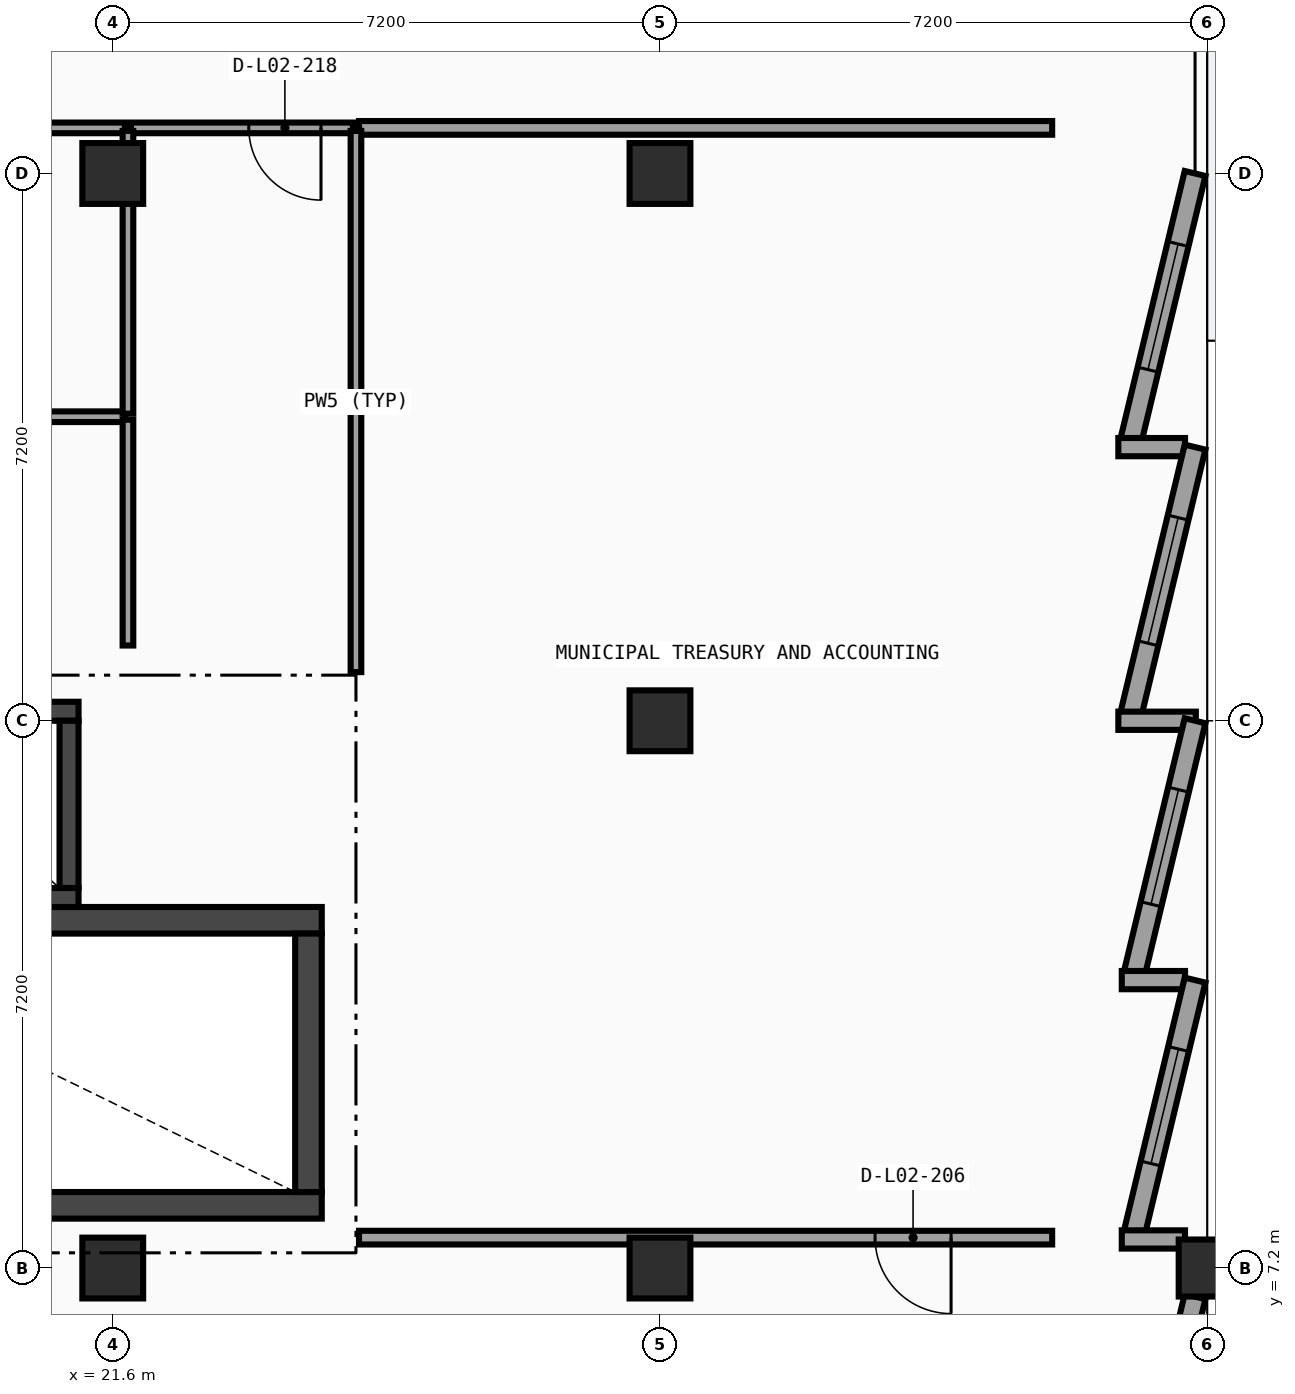
"""IFC4 building model, lengths in metres.
Left out: names, types, materials, properties, quantities, classifications, styles, units other than length and angle.
Written with IfcOpenShell. Run it as: python <this file> out.ifc"""

import sys

from ifc_helpers import new_model, si_unit, direction, frame, frame_2d, origin, origin_2d, place, context, subcontext, project, spatial, rectangle, extrude, element, fill, save


model = new_model("IFC4")
c1 = context("Model", 3, precision=1e-05, world=origin(), true_north=direction((0.0, 1.0)))
c2 = subcontext(c1, "Body", "Model", "MODEL_VIEW")
j1 = project(units=[si_unit("LENGTHUNIT", "METRE"), si_unit("PLANEANGLEUNIT", "RADIAN")], contexts=[c1])
p1 = place(None, origin())
s1 = spatial("IfcSite", under=j1, at=p1, CompositionType="ELEMENT")
p2 = place(p1, origin())
s2 = spatial("IfcBuilding", under=s1, at=p2, CompositionType="ELEMENT")
p3 = place(p2, frame((0.0, 0.0, 10.2)))
s3 = spatial("IfcBuildingStorey", under=s2, at=p3, CompositionType="ELEMENT", Elevation=10.2)
for number, where, z_axis, x_axis in (
    (1, (21.6, 7.2, 0.0), (0.0, 0.0, 1.0), (1.0, 0.0, 0.0)),
    (2, (21.6, 21.6, 0.0), (0.0, 0.0, 1.0), (1.0, 0.0, 0.0)),
    (3, (28.8, 7.2, 0.0), (0.0, 0.0, 1.0), (1.0, 0.0, 0.0)),
    (4, (28.8, 14.4, 0.0), (0.0, 0.0, 1.0), (1.0, 0.0, 0.0)),
    (5, (28.8, 21.6, 0.0), (0.0, 0.0, 1.0), (1.0, 0.0, 0.0)),
):
    element("IfcColumn", number, at=place(p3, frame(where, z_axis=z_axis, x_axis=x_axis)), inside=s3, PredefinedType="COLUMN", context=c2, shape_type="SweptSolid", body=[
        extrude(rectangle(XDim=0.8, YDim=0.8, at=origin_2d()), origin(), (0.0, 0.0, 1.0), 4.5),
    ])
p4 = place(p3, frame((36.0, 7.2, 0.0), z_axis=(0.0, 0.0, 1.0), x_axis=(1.0, 0.0, 0.0)))
e6 = element("IfcColumn", 6, at=p4, inside=s3, PredefinedType="COLUMN", context=c2, shape_type="SweptSolid", body=[
    extrude(rectangle(XDim=0.75, YDim=0.75, at=origin_2d()), origin(), (0.0, 0.0, 1.0), 4.5),
])
p5 = place(p3, frame((35.84, 21.6, 0.0), z_axis=(0.0, 0.0, 1.0), x_axis=(-0.233480453725, -0.972361495396, 0.0)))
e7 = element("IfcWall", 7, at=p5, inside=s3, PredefinedType="SOLIDWALL", context=c2, shape_type="SweptSolid", body=[
    extrude(rectangle(XDim=3.607, YDim=0.28, at=frame_2d((1.804, 0.0))), origin(), (0.0, 0.0, 1.0), 4.24),
])
p6 = place(p5, frame((0.954, 0.0, 0.8)))
e8 = element("IfcOpeningElement", 8, at=p6, cuts=e7, PredefinedType="OPENING", context=c2, shape_type="SweptSolid", body=[
    extrude(rectangle(XDim=1.7, YDim=1.85, at=frame_2d((0.85, 0.925))), frame((0.0, 0.15, 0.0), z_axis=(0.0, -1.0, 0.0), x_axis=(1.0, 0.0, 0.0)), (0.0, 0.0, 1.0), 0.3),
])
p7 = place(p3, frame((34.831, 18.0, 0.0), z_axis=(0.0, 0.0, 1.0), x_axis=(1.0, 0.0, 0.0)))
e9 = element("IfcWall", 9, at=p7, inside=s3, PredefinedType="SOLIDWALL", context=c2, shape_type="SweptSolid", body=[
    extrude(rectangle(XDim=0.877, YDim=0.24, at=frame_2d((0.438, 0.0))), origin(), (0.0, 0.0, 1.0), 4.24),
])
p8 = place(p3, frame((35.84, 18.0, 0.0), z_axis=(0.0, 0.0, 1.0), x_axis=(-0.233495818898, -0.972357805829, 0.0)))
e10 = element("IfcWall", 10, at=p8, inside=s3, PredefinedType="SOLIDWALL", context=c2, shape_type="SweptSolid", body=[
    extrude(rectangle(XDim=3.607, YDim=0.28, at=frame_2d((1.804, 0.0))), origin(), (0.0, 0.0, 1.0), 4.24),
])
p9 = place(p8, frame((0.954, 0.0, 0.8)))
e11 = element("IfcOpeningElement", 11, at=p9, cuts=e10, PredefinedType="OPENING", context=c2, shape_type="SweptSolid", body=[
    extrude(rectangle(XDim=1.7, YDim=1.85, at=frame_2d((0.85, 0.925))), frame((0.0, 0.15, 0.0), z_axis=(0.0, -1.0, 0.0), x_axis=(1.0, 0.0, 0.0)), (0.0, 0.0, 1.0), 0.3),
])
p10 = place(p3, frame((34.831, 14.4, 0.0), z_axis=(0.0, 0.0, 1.0), x_axis=(1.0, 0.0, 0.0)))
e12 = element("IfcWall", 12, at=p10, inside=s3, PredefinedType="SOLIDWALL", context=c2, shape_type="SweptSolid", body=[
    extrude(rectangle(XDim=1.019, YDim=0.24, at=frame_2d((0.51, 0.0))), origin(), (0.0, 0.0, 1.0), 4.24),
])
p11 = place(p3, frame((35.84, 14.4, 0.0), z_axis=(0.0, 0.0, 1.0), x_axis=(-0.23342163795, -0.972375616178, 0.0)))
e13 = element("IfcWall", 13, at=p11, inside=s3, PredefinedType="SOLIDWALL", context=c2, shape_type="SweptSolid", body=[
    extrude(rectangle(XDim=3.414, YDim=0.28, at=frame_2d((1.707, 0.0))), origin(), (0.0, 0.0, 1.0), 4.24),
])
p12 = place(p11, frame((0.932, 0.0, 0.8)))
e14 = element("IfcOpeningElement", 14, at=p12, cuts=e13, PredefinedType="OPENING", context=c2, shape_type="SweptSolid", body=[
    extrude(rectangle(XDim=1.55, YDim=1.8, at=frame_2d((0.775, 0.9))), frame((0.0, 0.15, 0.0), z_axis=(0.0, -1.0, 0.0), x_axis=(1.0, 0.0, 0.0)), (0.0, 0.0, 1.0), 0.3),
])
p13 = place(p3, frame((34.876, 10.988, 0.0), z_axis=(0.0, 0.0, 1.0), x_axis=(1.0, 0.0, 0.0)))
e15 = element("IfcWall", 15, at=p13, inside=s3, PredefinedType="SOLIDWALL", context=c2, shape_type="SweptSolid", body=[
    extrude(rectangle(XDim=0.832, YDim=0.24, at=frame_2d((0.416, 0.0))), origin(), (0.0, 0.0, 1.0), 4.24),
])
p14 = place(p3, frame((35.84, 10.988, 0.0), z_axis=(0.0, 0.0, 1.0), x_axis=(-0.23342163795, -0.972375616178, 0.0)))
e16 = element("IfcWall", 16, at=p14, inside=s3, PredefinedType="SOLIDWALL", context=c2, shape_type="SweptSolid", body=[
    extrude(rectangle(XDim=3.414, YDim=0.28, at=frame_2d((1.707, 0.0))), origin(), (0.0, 0.0, 1.0), 4.24),
])
p15 = place(p14, frame((0.932, 0.0, 0.8)))
e17 = element("IfcOpeningElement", 17, at=p15, cuts=e16, PredefinedType="OPENING", context=c2, shape_type="SweptSolid", body=[
    extrude(rectangle(XDim=1.55, YDim=1.8, at=frame_2d((0.775, 0.9))), frame((0.0, 0.15, 0.0), z_axis=(0.0, -1.0, 0.0), x_axis=(1.0, 0.0, 0.0)), (0.0, 0.0, 1.0), 0.3),
])
p16 = place(p3, frame((34.876, 7.576, 0.0), z_axis=(0.0, 0.0, 1.0), x_axis=(1.0, 0.0, 0.0)))
e18 = element("IfcWall", 18, at=p16, inside=s3, PredefinedType="SOLIDWALL", context=c2, shape_type="SweptSolid", body=[
    extrude(rectangle(XDim=0.832, YDim=0.24, at=frame_2d((0.416, 0.0))), origin(), (0.0, 0.0, 1.0), 4.24),
])
p17 = place(p3, frame((35.84, 6.824, 0.0), z_axis=(0.0, 0.0, 1.0), x_axis=(-0.233451302002, -0.972368494756, 0.0)))
e19 = element("IfcWall", 19, at=p17, inside=s3, PredefinedType="SOLIDWALL", context=c2, shape_type="SweptSolid", body=[
    extrude(rectangle(XDim=3.064, YDim=0.28, at=frame_2d((1.532, 0.0))), origin(), (0.0, 0.0, 1.0), 3.696),
])
p18 = place(p17, frame((0.757, 0.0, 0.8)))
e20 = element("IfcOpeningElement", 20, at=p18, cuts=e19, PredefinedType="OPENING", context=c2, shape_type="SweptSolid", body=[
    extrude(rectangle(XDim=1.55, YDim=1.8, at=frame_2d((0.775, 0.9))), frame((0.0, 0.15, 0.0), z_axis=(0.0, -1.0, 0.0), x_axis=(1.0, 0.0, 0.0)), (0.0, 0.0, 1.0), 0.3),
])
for number, where, z_axis, x_axis in (
    (21, (15.05, 8.025, 0.0), (0.0, 0.0, 1.0), (1.0, 0.0, 0.0)),
    (22, (24.35, 11.775, 0.0), (0.0, 0.0, 1.0), (-1.0, 0.0, 0.0)),
):
    element("IfcWall", number, at=place(p3, frame(where, z_axis=z_axis, x_axis=x_axis)), inside=s3, PredefinedType="SHEAR", context=c2, shape_type="SweptSolid", body=[
        extrude(rectangle(XDim=9.3, YDim=0.35, at=frame_2d((4.65, 0.0))), origin(), (0.0, 0.0, 1.0), 4.24),
    ])
p19 = place(p3, frame((24.175, 8.2, 0.0), z_axis=(0.0, 0.0, 1.0), x_axis=(0.0, 1.0, 0.0)))
e23 = element("IfcWall", 23, at=p19, inside=s3, PredefinedType="SHEAR", context=c2, shape_type="SweptSolid", body=[
    extrude(rectangle(XDim=3.4, YDim=0.35, at=frame_2d((1.7, 0.0))), origin(), (0.0, 0.0, 1.0), 4.24),
])
for number, where, z_axis, x_axis in (
    (24, (18.15, 12.075, 0.0), (0.0, 0.0, 1.0), (1.0, 0.0, 0.0)),
    (25, (21.15, 14.525, 0.0), (0.0, 0.0, 1.0), (-1.0, 0.0, 0.0)),
):
    element("IfcWall", number, at=place(p3, frame(where, z_axis=z_axis, x_axis=x_axis)), inside=s3, PredefinedType="SHEAR", context=c2, shape_type="SweptSolid", body=[
        extrude(rectangle(XDim=3.0, YDim=0.25, at=frame_2d((1.5, 0.0))), origin(), (0.0, 0.0, 1.0), 4.24),
    ])
p20 = place(p3, frame((21.025, 12.2, 0.0), z_axis=(0.0, 0.0, 1.0), x_axis=(0.0, 1.0, 0.0)))
e26 = element("IfcWall", 26, at=p20, inside=s3, PredefinedType="SHEAR", context=c2, shape_type="SweptSolid", body=[
    extrude(rectangle(XDim=2.2, YDim=0.25, at=frame_2d((1.1, 0.0))), origin(), (0.0, 0.0, 1.0), 4.24),
])
p21 = place(p3, frame((24.84, 22.2, 0.0), z_axis=(0.0, 0.0, 1.0), x_axis=(1.0, 0.0, 0.0)))
e27 = element("IfcWall", 27, at=p21, inside=s3, PredefinedType="PARTITIONING", context=c2, shape_type="SweptSolid", body=[
    extrude(rectangle(XDim=9.12, YDim=0.18, at=frame_2d((4.56, 0.0))), origin(), (0.0, 0.0, 1.0), 3.451),
])
p22 = place(p3, frame((17.64, 22.2, 0.0), z_axis=(0.0, 0.0, 1.0), x_axis=(1.0, 0.0, 0.0)))
e28 = element("IfcWall", 28, at=p22, inside=s3, PredefinedType="PARTITIONING", context=c2, shape_type="SweptSolid", body=[
    extrude(rectangle(XDim=4.12, YDim=0.14, at=frame_2d((2.06, 0.0))), origin(), (0.0, 0.0, 1.0), 3.451),
])
p23 = place(p22, frame((0.42, 0.0, 0.0)))
e29 = element("IfcOpeningElement", 29, at=p23, cuts=e28, PredefinedType="OPENING", context=c2, shape_type="SweptSolid", body=[
    extrude(rectangle(XDim=0.95, YDim=2.08, at=frame_2d((0.475, 1.04))), frame((0.0, 0.08, 0.0), z_axis=(0.0, -1.0, 0.0), x_axis=(1.0, 0.0, 0.0)), (0.0, 0.0, 1.0), 0.16),
])
p24 = place(p3, frame((21.84, 22.2, 0.0), z_axis=(0.0, 0.0, 1.0), x_axis=(1.0, 0.0, 0.0)))
e30 = element("IfcWall", 30, at=p24, inside=s3, PredefinedType="PARTITIONING", context=c2, shape_type="SweptSolid", body=[
    extrude(rectangle(XDim=2.92, YDim=0.14, at=frame_2d((1.46, 0.0))), origin(), (0.0, 0.0, 1.0), 4.24),
])
p25 = place(p24, frame((1.55, 0.0, 0.0)))
e31 = element("IfcOpeningElement", 31, at=p25, cuts=e30, PredefinedType="OPENING", context=c2, shape_type="SweptSolid", body=[
    extrude(rectangle(XDim=0.95, YDim=2.08, at=frame_2d((0.475, 1.04))), frame((0.0, 0.08, 0.0), z_axis=(0.0, -1.0, 0.0), x_axis=(1.0, 0.0, 0.0)), (0.0, 0.0, 1.0), 0.16),
])
p26 = place(p3, frame((24.84, 7.6, 0.0), z_axis=(0.0, 0.0, 1.0), x_axis=(1.0, 0.0, 0.0)))
e32 = element("IfcWall", 32, at=p26, inside=s3, PredefinedType="PARTITIONING", context=c2, shape_type="SweptSolid", body=[
    extrude(rectangle(XDim=9.12, YDim=0.18, at=frame_2d((4.56, 0.0))), origin(), (0.0, 0.0, 1.0), 3.451),
])
p27 = place(p26, frame((6.79, 0.0, 0.0)))
e33 = element("IfcOpeningElement", 33, at=p27, cuts=e32, PredefinedType="OPENING", context=c2, shape_type="SweptSolid", body=[
    extrude(rectangle(XDim=1.0, YDim=2.1, at=frame_2d((0.5, 1.05))), frame((0.0, 0.1, 0.0), z_axis=(0.0, -1.0, 0.0), x_axis=(1.0, 0.0, 0.0)), (0.0, 0.0, 1.0), 0.2),
])
p28 = place(p3, frame((24.8, 15.04, 0.0), z_axis=(0.0, 0.0, 1.0), x_axis=(0.0, 1.0, 0.0)))
e34 = element("IfcWall", 34, at=p28, inside=s3, PredefinedType="PARTITIONING", context=c2, shape_type="SweptSolid", body=[
    extrude(rectangle(XDim=7.12, YDim=0.14, at=frame_2d((3.56, 0.0))), origin(), (0.0, 0.0, 1.0), 3.618),
])
p29 = place(p3, frame((17.64, 18.4, 0.0), z_axis=(0.0, 0.0, 1.0), x_axis=(1.0, 0.0, 0.0)))
e35 = element("IfcWall", 35, at=p29, inside=s3, PredefinedType="PARTITIONING", context=c2, shape_type="SweptSolid", body=[
    extrude(rectangle(XDim=4.12, YDim=0.14, at=frame_2d((2.06, 0.0))), origin(), (0.0, 0.0, 1.0), 4.24),
])
p30 = place(p29, frame((0.42, 0.0, 0.0)))
e36 = element("IfcOpeningElement", 36, at=p30, cuts=e35, PredefinedType="OPENING", context=c2, shape_type="SweptSolid", body=[
    extrude(rectangle(XDim=0.95, YDim=2.08, at=frame_2d((0.475, 1.04))), frame((0.0, 0.08, 0.0), z_axis=(0.0, -1.0, 0.0), x_axis=(1.0, 0.0, 0.0)), (0.0, 0.0, 1.0), 0.16),
])
p31 = place(p3, frame((21.8, 15.39, 0.0), z_axis=(0.0, 0.0, 1.0), x_axis=(0.0, 1.0, 0.0)))
e37 = element("IfcWall", 37, at=p31, inside=s3, PredefinedType="PARTITIONING", context=c2, shape_type="SweptSolid", body=[
    extrude(rectangle(XDim=2.97, YDim=0.14, at=frame_2d((1.485, 0.0))), origin(), (0.0, 0.0, 1.0), 4.24),
])
p32 = place(p3, frame((21.8, 18.44, 0.0), z_axis=(0.0, 0.0, 1.0), x_axis=(0.0, 1.0, 0.0)))
e38 = element("IfcWall", 38, at=p32, inside=s3, PredefinedType="PARTITIONING", context=c2, shape_type="SweptSolid", body=[
    extrude(rectangle(XDim=3.72, YDim=0.14, at=frame_2d((1.86, 0.0))), origin(), (0.0, 0.0, 1.0), 3.451),
])
p33 = place(p6, origin())
e39 = element("IfcWindow", 39, at=p33, inside=s3, PartitioningType="SINGLE_PANEL", PredefinedType="WINDOW", context=c2, shape_type="SweptSolid", body=[
    extrude(rectangle(XDim=1.7, YDim=1.85, at=frame_2d((0.85, 0.925))), frame((0.0, 0.03, 0.0), z_axis=(0.0, -1.0, 0.0), x_axis=(1.0, 0.0, 0.0)), (0.0, 0.0, 1.0), 0.06),
])
fill(e8, e39)
p34 = place(p9, origin())
e40 = element("IfcWindow", 40, at=p34, inside=s3, PartitioningType="SINGLE_PANEL", PredefinedType="WINDOW", context=c2, shape_type="SweptSolid", body=[
    extrude(rectangle(XDim=1.7, YDim=1.85, at=frame_2d((0.85, 0.925))), frame((0.0, 0.03, 0.0), z_axis=(0.0, -1.0, 0.0), x_axis=(1.0, 0.0, 0.0)), (0.0, 0.0, 1.0), 0.06),
])
fill(e11, e40)
p35 = place(p12, origin())
e41 = element("IfcWindow", 41, at=p35, inside=s3, PartitioningType="SINGLE_PANEL", PredefinedType="WINDOW", context=c2, shape_type="SweptSolid", body=[
    extrude(rectangle(XDim=1.55, YDim=1.8, at=frame_2d((0.775, 0.9))), frame((0.0, 0.03, 0.0), z_axis=(0.0, -1.0, 0.0), x_axis=(1.0, 0.0, 0.0)), (0.0, 0.0, 1.0), 0.06),
])
fill(e14, e41)
p36 = place(p15, origin())
e42 = element("IfcWindow", 42, at=p36, inside=s3, PartitioningType="SINGLE_PANEL", PredefinedType="WINDOW", context=c2, shape_type="SweptSolid", body=[
    extrude(rectangle(XDim=1.55, YDim=1.8, at=frame_2d((0.775, 0.9))), frame((0.0, 0.03, 0.0), z_axis=(0.0, -1.0, 0.0), x_axis=(1.0, 0.0, 0.0)), (0.0, 0.0, 1.0), 0.06),
])
fill(e17, e42)
p37 = place(p27, origin())
e43 = element("IfcDoor", 43, at=p37, inside=s3, OperationType="SINGLE_SWING_RIGHT", PredefinedType="DOOR", context=c2, shape_type="SweptSolid", body=[
    extrude(rectangle(XDim=1.0, YDim=2.1, at=frame_2d((0.5, 1.05))), frame((0.0, 0.025, 0.0), z_axis=(0.0, -1.0, 0.0), x_axis=(1.0, 0.0, 0.0)), (0.0, 0.0, 1.0), 0.05),
])
fill(e33, e43)
p38 = place(p25, origin())
e44 = element("IfcDoor", 44, at=p38, inside=s3, OperationType="SINGLE_SWING_RIGHT", PredefinedType="DOOR", context=c2, shape_type="SweptSolid", body=[
    extrude(rectangle(XDim=0.95, YDim=2.08, at=frame_2d((0.475, 1.04))), frame((0.0, 0.025, 0.0), z_axis=(0.0, -1.0, 0.0), x_axis=(1.0, 0.0, 0.0)), (0.0, 0.0, 1.0), 0.05),
])
fill(e31, e44)
save(model, sys.argv[1])
